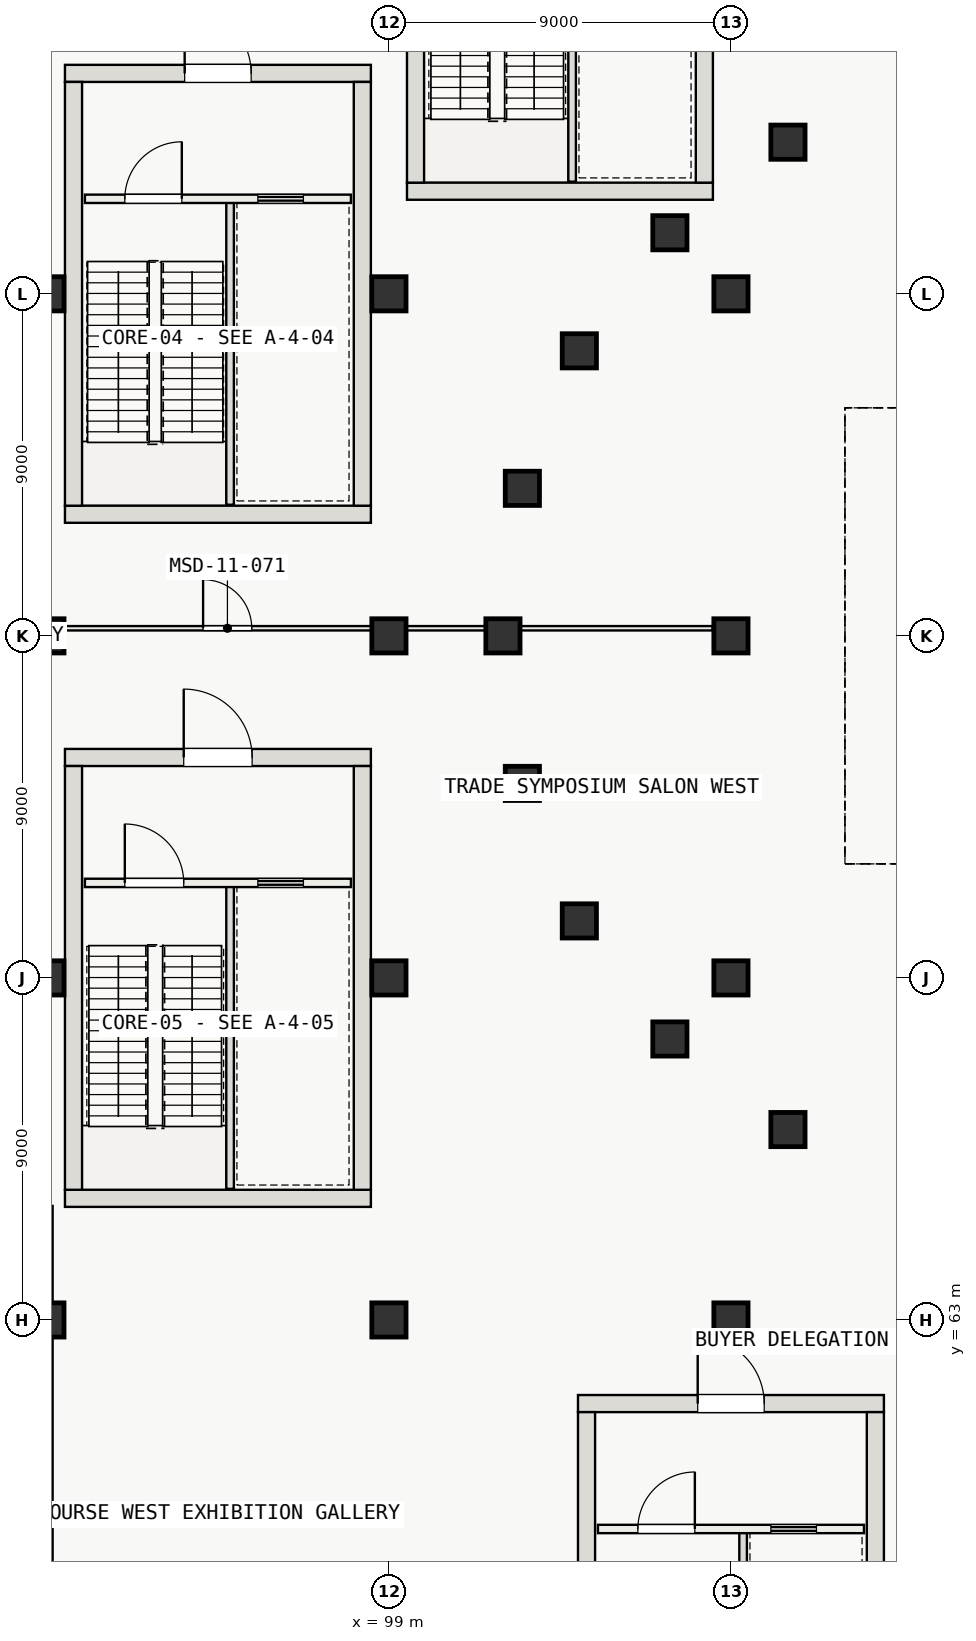
"""IFC4 building model, lengths in metres.
Left out: names, types, materials, properties, quantities, classifications, styles, units other than length and angle.
Written with IfcOpenShell. Run it as: python <this file> out.ifc"""

import sys

from ifc_helpers import new_model, si_unit, direction, frame, frame_2d, origin, origin_2d, place, context, subcontext, project, spatial, rectangle, circle, extrude, element, fill, save


model = new_model("IFC4")
c1 = context("Model", 3, precision=1e-05, world=origin(), true_north=direction((0.0, 1.0)))
c2 = subcontext(c1, "Body", "Model", "MODEL_VIEW")
j1 = project(units=[si_unit("LENGTHUNIT", "METRE"), si_unit("PLANEANGLEUNIT", "RADIAN")], contexts=[c1])
p1 = place(None, origin())
s1 = spatial("IfcSite", under=j1, at=p1, CompositionType="ELEMENT")
p2 = place(p1, origin())
s2 = spatial("IfcBuilding", under=s1, at=p2, CompositionType="ELEMENT")
p3 = place(p2, frame((0.0, 0.0, 6.0)))
s3 = spatial("IfcBuildingStorey", under=s2, at=p3, CompositionType="ELEMENT", Elevation=6.0)
p4 = place(p3, frame((99.475, 92.7, 0.0), z_axis=(0.0, 0.0, 1.0), x_axis=(1.0, 0.0, 0.0)))
e1 = element("IfcWall", 1, at=p4, inside=s3, PredefinedType="SHEAR", context=c2, shape_type="SweptSolid", body=[
    extrude(rectangle(XDim=8.05, YDim=0.45, at=frame_2d((4.025, 0.0))), origin(), (0.0, 0.0, 1.0), 6.0),
])
for number, where, z_axis, x_axis in (
    (2, (99.7, 92.925, 0.0), (0.0, 0.0, 1.0), (0.0, 1.0, 0.0)),
    (3, (107.3, 92.925, 0.0), (0.0, 0.0, 1.0), (0.0, 1.0, 0.0)),
):
    element("IfcWall", number, at=place(p3, frame(where, z_axis=z_axis, x_axis=x_axis)), inside=s3, PredefinedType="SHEAR", context=c2, shape_type="SweptSolid", body=[
        extrude(rectangle(XDim=11.15, YDim=0.45, at=frame_2d((5.575, 0.0))), origin(), (0.0, 0.0, 1.0), 6.0),
    ])
p5 = place(p3, frame((90.475, 84.2, 0.0), z_axis=(0.0, 0.0, 1.0), x_axis=(1.0, 0.0, 0.0)))
e4 = element("IfcWall", 4, at=p5, inside=s3, PredefinedType="SHEAR", context=c2, shape_type="SweptSolid", body=[
    extrude(rectangle(XDim=8.05, YDim=0.45, at=frame_2d((4.025, 0.0))), origin(), (0.0, 0.0, 1.0), 6.0),
])
p6 = place(p3, frame((90.475, 95.8, 0.0), z_axis=(0.0, 0.0, 1.0), x_axis=(1.0, 0.0, 0.0)))
e5 = element("IfcWall", 5, at=p6, inside=s3, PredefinedType="SHEAR", context=c2, shape_type="SweptSolid", body=[
    extrude(rectangle(XDim=8.05, YDim=0.45, at=frame_2d((4.025, 0.0))), origin(), (0.0, 0.0, 1.0), 6.0),
])
p7 = place(p6, frame((3.15, 0.0, 0.0)))
e6 = element("IfcOpeningElement", 6, at=p7, cuts=e5, PredefinedType="OPENING", context=c2, shape_type="SweptSolid", body=[
    extrude(rectangle(XDim=1.75, YDim=2.3, at=frame_2d((0.875, 1.15))), frame((0.0, 0.235, 0.0), z_axis=(0.0, -1.0, 0.0), x_axis=(1.0, 0.0, 0.0)), (0.0, 0.0, 1.0), 0.47),
])
for number, where, z_axis, x_axis in (
    (7, (90.7, 84.425, 0.0), (0.0, 0.0, 1.0), (0.0, 1.0, 0.0)),
    (8, (98.3, 84.425, 0.0), (0.0, 0.0, 1.0), (0.0, 1.0, 0.0)),
):
    element("IfcWall", number, at=place(p3, frame(where, z_axis=z_axis, x_axis=x_axis)), inside=s3, PredefinedType="SHEAR", context=c2, shape_type="SweptSolid", body=[
        extrude(rectangle(XDim=11.15, YDim=0.45, at=frame_2d((5.575, 0.0))), origin(), (0.0, 0.0, 1.0), 6.0),
    ])
p8 = place(p3, frame((90.475, 66.2, 0.0), z_axis=(0.0, 0.0, 1.0), x_axis=(1.0, 0.0, 0.0)))
e9 = element("IfcWall", 9, at=p8, inside=s3, PredefinedType="SHEAR", context=c2, shape_type="SweptSolid", body=[
    extrude(rectangle(XDim=8.05, YDim=0.45, at=frame_2d((4.025, 0.0))), origin(), (0.0, 0.0, 1.0), 6.0),
])
p9 = place(p3, frame((90.475, 77.8, 0.0), z_axis=(0.0, 0.0, 1.0), x_axis=(1.0, 0.0, 0.0)))
e10 = element("IfcWall", 10, at=p9, inside=s3, PredefinedType="SHEAR", context=c2, shape_type="SweptSolid", body=[
    extrude(rectangle(XDim=8.05, YDim=0.45, at=frame_2d((4.025, 0.0))), origin(), (0.0, 0.0, 1.0), 6.0),
])
p10 = place(p9, frame((3.125, 0.0, 0.0)))
e11 = element("IfcOpeningElement", 11, at=p10, cuts=e10, PredefinedType="OPENING", context=c2, shape_type="SweptSolid", body=[
    extrude(rectangle(XDim=1.8, YDim=2.3, at=frame_2d((0.9, 1.15))), frame((0.0, 0.235, 0.0), z_axis=(0.0, -1.0, 0.0), x_axis=(1.0, 0.0, 0.0)), (0.0, 0.0, 1.0), 0.47),
])
for number, where, z_axis, x_axis in (
    (12, (90.7, 66.425, 0.0), (0.0, 0.0, 1.0), (0.0, 1.0, 0.0)),
    (13, (98.3, 66.425, 0.0), (0.0, 0.0, 1.0), (0.0, 1.0, 0.0)),
):
    element("IfcWall", number, at=place(p3, frame(where, z_axis=z_axis, x_axis=x_axis)), inside=s3, PredefinedType="SHEAR", context=c2, shape_type="SweptSolid", body=[
        extrude(rectangle(XDim=11.15, YDim=0.45, at=frame_2d((5.575, 0.0))), origin(), (0.0, 0.0, 1.0), 6.0),
    ])
p11 = place(p3, frame((103.975, 60.8, 0.0), z_axis=(0.0, 0.0, 1.0), x_axis=(1.0, 0.0, 0.0)))
e14 = element("IfcWall", 14, at=p11, inside=s3, PredefinedType="SHEAR", context=c2, shape_type="SweptSolid", body=[
    extrude(rectangle(XDim=8.05, YDim=0.45, at=frame_2d((4.025, 0.0))), origin(), (0.0, 0.0, 1.0), 6.0),
])
p12 = place(p11, frame((3.15, 0.0, 0.0)))
e15 = element("IfcOpeningElement", 15, at=p12, cuts=e14, PredefinedType="OPENING", context=c2, shape_type="SweptSolid", body=[
    extrude(rectangle(XDim=1.75, YDim=2.3, at=frame_2d((0.875, 1.15))), frame((0.0, 0.235, 0.0), z_axis=(0.0, -1.0, 0.0), x_axis=(1.0, 0.0, 0.0)), (0.0, 0.0, 1.0), 0.47),
])
for number, where, z_axis, x_axis in (
    (16, (104.2, 49.425, 0.0), (0.0, 0.0, 1.0), (0.0, 1.0, 0.0)),
    (17, (111.8, 49.425, 0.0), (0.0, 0.0, 1.0), (0.0, 1.0, 0.0)),
):
    element("IfcWall", number, at=place(p3, frame(where, z_axis=z_axis, x_axis=x_axis)), inside=s3, PredefinedType="SHEAR", context=c2, shape_type="SweptSolid", body=[
        extrude(rectangle(XDim=11.15, YDim=0.45, at=frame_2d((5.575, 0.0))), origin(), (0.0, 0.0, 1.0), 6.0),
    ])
p13 = place(p3, frame((90.0, 54.0, 0.0), z_axis=(0.0, 0.0, 1.0), x_axis=(0.0, 1.0, 0.0)))
e18 = element("IfcWall", 18, at=p13, inside=s3, PredefinedType="SHEAR", context=c2, shape_type="SweptSolid", body=[
    extrude(rectangle(XDim=12.0, YDim=0.3, at=frame_2d((6.0, 0.0))), origin(), (0.0, 0.0, 1.0), 6.0),
])
for number, where, z_axis, x_axis in (
    (19, (90.0, 63.0, 0.0), (0.0, 0.0, 1.0), (1.0, 0.0, 0.0)),
    (20, (90.0, 72.0, 0.0), (0.0, 0.0, 1.0), (1.0, 0.0, 0.0)),
    (21, (90.0, 81.0, 0.0), (0.0, 0.0, 1.0), (1.0, 0.0, 0.0)),
    (22, (90.0, 90.0, 0.0), (0.0, 0.0, 1.0), (1.0, 0.0, 0.0)),
    (23, (99.0, 63.0, 0.0), (0.0, 0.0, 1.0), (1.0, 0.0, 0.0)),
    (24, (99.0, 72.0, 0.0), (0.0, 0.0, 1.0), (1.0, 0.0, 0.0)),
    (25, (99.0, 81.0, 0.0), (0.0, 0.0, 1.0), (1.0, 0.0, 0.0)),
    (26, (99.0, 90.0, 0.0), (0.0, 0.0, 1.0), (1.0, 0.0, 0.0)),
):
    element("IfcColumn", number, at=place(p3, frame(where, z_axis=z_axis, x_axis=x_axis)), inside=s3, PredefinedType="COLUMN", context=c2, shape_type="SweptSolid", body=[
        extrude(rectangle(XDim=0.9, YDim=0.9, at=origin_2d()), origin(), (0.0, 0.0, 1.0), 6.0),
    ])
for number, where, z_axis, x_axis in (
    (27, (102.0, 81.0, 0.0), (0.0, 0.0, 1.0), (1.0, 0.0, 0.0)),
    (28, (102.511, 77.118, 0.0), (0.0, 0.0, 1.0), (1.0, 0.0, 0.0)),
    (29, (102.511, 84.882, 0.0), (0.0, 0.0, 1.0), (1.0, 0.0, 0.0)),
    (30, (104.01, 73.5, 0.0), (0.0, 0.0, 1.0), (1.0, 0.0, 0.0)),
    (31, (104.01, 88.5, 0.0), (0.0, 0.0, 1.0), (1.0, 0.0, 0.0)),
    (32, (106.393, 70.393, 0.0), (0.0, 0.0, 1.0), (1.0, 0.0, 0.0)),
    (33, (106.393, 91.607, 0.0), (0.0, 0.0, 1.0), (1.0, 0.0, 0.0)),
):
    element("IfcColumn", number, at=place(p3, frame(where, z_axis=z_axis, x_axis=x_axis)), inside=s3, PredefinedType="COLUMN", context=c2, shape_type="SweptSolid", body=[
        extrude(circle(Radius=0.45, at=origin_2d()), origin(), (0.0, 0.0, 1.0), 6.0),
    ])
for number, where, z_axis, x_axis in (
    (34, (108.0, 63.0, 0.0), (0.0, 0.0, 1.0), (1.0, 0.0, 0.0)),
    (35, (108.0, 72.0, 0.0), (0.0, 0.0, 1.0), (1.0, 0.0, 0.0)),
    (36, (108.0, 81.0, 0.0), (0.0, 0.0, 1.0), (1.0, 0.0, 0.0)),
    (37, (108.0, 90.0, 0.0), (0.0, 0.0, 1.0), (1.0, 0.0, 0.0)),
):
    element("IfcColumn", number, at=place(p3, frame(where, z_axis=z_axis, x_axis=x_axis)), inside=s3, PredefinedType="COLUMN", context=c2, shape_type="SweptSolid", body=[
        extrude(rectangle(XDim=0.9, YDim=0.9, at=origin_2d()), origin(), (0.0, 0.0, 1.0), 6.0),
    ])
for number, where, z_axis, x_axis in (
    (38, (109.5, 68.01, 0.0), (0.0, 0.0, 1.0), (1.0, 0.0, 0.0)),
    (39, (109.5, 93.99, 0.0), (0.0, 0.0, 1.0), (1.0, 0.0, 0.0)),
):
    element("IfcColumn", number, at=place(p3, frame(where, z_axis=z_axis, x_axis=x_axis)), inside=s3, PredefinedType="COLUMN", context=c2, shape_type="SweptSolid", body=[
        extrude(circle(Radius=0.45, at=origin_2d()), origin(), (0.0, 0.0, 1.0), 6.0),
    ])
for number, where, z_axis, x_axis in (
    (40, (103.82, 92.95, 0.0), (0.0, 0.0, 1.0), (0.0, 1.0, 0.0)),
    (41, (94.82, 84.45, 0.0), (0.0, 0.0, 1.0), (0.0, 1.0, 0.0)),
):
    element("IfcWall", number, at=place(p3, frame(where, z_axis=z_axis, x_axis=x_axis)), inside=s3, PredefinedType="SOLIDWALL", context=c2, shape_type="SweptSolid", body=[
        extrude(rectangle(XDim=8.0, YDim=0.2, at=frame_2d((4.0, 0.0))), origin(), (0.0, 0.0, 1.0), 6.0),
    ])
p14 = place(p3, frame((91.0, 92.5, 0.0), z_axis=(0.0, 0.0, 1.0), x_axis=(1.0, 0.0, 0.0)))
e42 = element("IfcWall", 42, at=p14, inside=s3, PredefinedType="SOLIDWALL", context=c2, shape_type="SweptSolid", body=[
    extrude(rectangle(XDim=7.0, YDim=0.22, at=frame_2d((3.5, 0.0))), origin(), (0.0, 0.0, 1.0), 5.62),
])
p15 = place(p14, frame((1.05, 0.0, 0.0)))
e43 = element("IfcOpeningElement", 43, at=p15, cuts=e42, PredefinedType="OPENING", context=c2, shape_type="SweptSolid", body=[
    extrude(rectangle(XDim=1.5, YDim=2.2, at=frame_2d((0.75, 1.1))), frame((0.0, 0.12, 0.0), z_axis=(0.0, -1.0, 0.0), x_axis=(1.0, 0.0, 0.0)), (0.0, 0.0, 1.0), 0.24),
])
p16 = place(p14, frame((4.55, 0.0, 0.0)))
e44 = element("IfcOpeningElement", 44, at=p16, cuts=e42, PredefinedType="OPENING", context=c2, shape_type="SweptSolid", body=[
    extrude(rectangle(XDim=1.2, YDim=2.2, at=frame_2d((0.6, 1.1))), frame((0.0, 0.12, 0.0), z_axis=(0.0, -1.0, 0.0), x_axis=(1.0, 0.0, 0.0)), (0.0, 0.0, 1.0), 0.24),
])
p17 = place(p3, frame((94.82, 66.45, 0.0), z_axis=(0.0, 0.0, 1.0), x_axis=(0.0, 1.0, 0.0)))
e45 = element("IfcWall", 45, at=p17, inside=s3, PredefinedType="SOLIDWALL", context=c2, shape_type="SweptSolid", body=[
    extrude(rectangle(XDim=8.0, YDim=0.2, at=frame_2d((4.0, 0.0))), origin(), (0.0, 0.0, 1.0), 6.0),
])
p18 = place(p3, frame((91.0, 74.5, 0.0), z_axis=(0.0, 0.0, 1.0), x_axis=(1.0, 0.0, 0.0)))
e46 = element("IfcWall", 46, at=p18, inside=s3, PredefinedType="SOLIDWALL", context=c2, shape_type="SweptSolid", body=[
    extrude(rectangle(XDim=7.0, YDim=0.22, at=frame_2d((3.5, 0.0))), origin(), (0.0, 0.0, 1.0), 5.62),
])
p19 = place(p18, frame((1.05, 0.0, 0.0)))
e47 = element("IfcOpeningElement", 47, at=p19, cuts=e46, PredefinedType="OPENING", context=c2, shape_type="SweptSolid", body=[
    extrude(rectangle(XDim=1.55, YDim=2.2, at=frame_2d((0.775, 1.1))), frame((0.0, 0.12, 0.0), z_axis=(0.0, -1.0, 0.0), x_axis=(1.0, 0.0, 0.0)), (0.0, 0.0, 1.0), 0.24),
])
p20 = place(p18, frame((4.55, 0.0, 0.0)))
e48 = element("IfcOpeningElement", 48, at=p20, cuts=e46, PredefinedType="OPENING", context=c2, shape_type="SweptSolid", body=[
    extrude(rectangle(XDim=1.2, YDim=2.2, at=frame_2d((0.6, 1.1))), frame((0.0, 0.12, 0.0), z_axis=(0.0, -1.0, 0.0), x_axis=(1.0, 0.0, 0.0)), (0.0, 0.0, 1.0), 0.24),
])
p21 = place(p3, frame((108.32, 49.45, 0.0), z_axis=(0.0, 0.0, 1.0), x_axis=(0.0, 1.0, 0.0)))
e49 = element("IfcWall", 49, at=p21, inside=s3, PredefinedType="SOLIDWALL", context=c2, shape_type="SweptSolid", body=[
    extrude(rectangle(XDim=8.0, YDim=0.2, at=frame_2d((4.0, 0.0))), origin(), (0.0, 0.0, 1.0), 6.0),
])
p22 = place(p3, frame((104.5, 57.5, 0.0), z_axis=(0.0, 0.0, 1.0), x_axis=(1.0, 0.0, 0.0)))
e50 = element("IfcWall", 50, at=p22, inside=s3, PredefinedType="SOLIDWALL", context=c2, shape_type="SweptSolid", body=[
    extrude(rectangle(XDim=7.0, YDim=0.22, at=frame_2d((3.5, 0.0))), origin(), (0.0, 0.0, 1.0), 5.62),
])
p23 = place(p22, frame((1.05, 0.0, 0.0)))
e51 = element("IfcOpeningElement", 51, at=p23, cuts=e50, PredefinedType="OPENING", context=c2, shape_type="SweptSolid", body=[
    extrude(rectangle(XDim=1.5, YDim=2.2, at=frame_2d((0.75, 1.1))), frame((0.0, 0.12, 0.0), z_axis=(0.0, -1.0, 0.0), x_axis=(1.0, 0.0, 0.0)), (0.0, 0.0, 1.0), 0.24),
])
p24 = place(p22, frame((4.55, 0.0, 0.0)))
e52 = element("IfcOpeningElement", 52, at=p24, cuts=e50, PredefinedType="OPENING", context=c2, shape_type="SweptSolid", body=[
    extrude(rectangle(XDim=1.2, YDim=2.2, at=frame_2d((0.6, 1.1))), frame((0.0, 0.12, 0.0), z_axis=(0.0, -1.0, 0.0), x_axis=(1.0, 0.0, 0.0)), (0.0, 0.0, 1.0), 0.24),
])
p25 = place(p3, frame((81.98, 81.2, 0.0), z_axis=(0.0, 0.0, 1.0), x_axis=(1.0, 0.0, 0.0)))
e53 = element("IfcWall", 53, at=p25, inside=s3, PredefinedType="PARTITIONING", context=c2, shape_type="SweptSolid", body=[
    extrude(rectangle(XDim=25.54, YDim=0.115, at=frame_2d((12.77, 0.0))), origin(), (0.0, 0.0, 1.0), 4.64),
])
p26 = place(p25, frame((12.13, 0.0, 0.0)))
e54 = element("IfcOpeningElement", 54, at=p26, cuts=e53, PredefinedType="OPENING", context=c2, shape_type="SweptSolid", body=[
    extrude(rectangle(XDim=1.28, YDim=2.18, at=frame_2d((0.64, 1.09))), frame((0.0, 0.067, 0.0), z_axis=(0.0, -1.0, 0.0), x_axis=(1.0, 0.0, 0.0)), (0.0, 0.0, 1.0), 0.135),
])
p27 = place(p15, origin())
e55 = element("IfcDoor", 55, at=p27, inside=s3, OperationType="SINGLE_SWING_RIGHT", PredefinedType="DOOR", context=c2, shape_type="SweptSolid", body=[
    extrude(rectangle(XDim=1.5, YDim=2.2, at=frame_2d((0.75, 1.1))), frame((0.0, 0.025, 0.0), z_axis=(0.0, -1.0, 0.0), x_axis=(1.0, 0.0, 0.0)), (0.0, 0.0, 1.0), 0.05),
])
fill(e43, e55)
p28 = place(p16, origin())
e56 = element("IfcDoor", 56, at=p28, inside=s3, OperationType="SLIDING_TO_RIGHT", PredefinedType="DOOR", context=c2, shape_type="SweptSolid", body=[
    extrude(rectangle(XDim=1.2, YDim=2.2, at=frame_2d((0.6, 1.1))), frame((0.0, 0.025, 0.0), z_axis=(0.0, -1.0, 0.0), x_axis=(1.0, 0.0, 0.0)), (0.0, 0.0, 1.0), 0.05),
])
fill(e44, e56)
p29 = place(p7, origin())
e57 = element("IfcDoor", 57, at=p29, inside=s3, OperationType="DOUBLE_DOOR_SINGLE_SWING", PredefinedType="DOOR", context=c2, shape_type="SweptSolid", body=[
    extrude(rectangle(XDim=1.75, YDim=2.3, at=frame_2d((0.875, 1.15))), frame((0.0, 0.025, 0.0), z_axis=(0.0, -1.0, 0.0), x_axis=(1.0, 0.0, 0.0)), (0.0, 0.0, 1.0), 0.05),
])
fill(e6, e57)
p30 = place(p19, origin())
e58 = element("IfcDoor", 58, at=p30, inside=s3, OperationType="SINGLE_SWING_LEFT", PredefinedType="DOOR", context=c2, shape_type="SweptSolid", body=[
    extrude(rectangle(XDim=1.55, YDim=2.2, at=frame_2d((0.775, 1.1))), frame((0.0, 0.025, 0.0), z_axis=(0.0, -1.0, 0.0), x_axis=(1.0, 0.0, 0.0)), (0.0, 0.0, 1.0), 0.05),
])
fill(e47, e58)
p31 = place(p20, origin())
e59 = element("IfcDoor", 59, at=p31, inside=s3, OperationType="SLIDING_TO_LEFT", PredefinedType="DOOR", context=c2, shape_type="SweptSolid", body=[
    extrude(rectangle(XDim=1.2, YDim=2.2, at=frame_2d((0.6, 1.1))), frame((0.0, 0.025, 0.0), z_axis=(0.0, -1.0, 0.0), x_axis=(1.0, 0.0, 0.0)), (0.0, 0.0, 1.0), 0.05),
])
fill(e48, e59)
p32 = place(p10, origin())
e60 = element("IfcDoor", 60, at=p32, inside=s3, OperationType="DOUBLE_DOOR_SINGLE_SWING", PredefinedType="DOOR", context=c2, shape_type="SweptSolid", body=[
    extrude(rectangle(XDim=1.8, YDim=2.3, at=frame_2d((0.9, 1.15))), frame((0.0, 0.025, 0.0), z_axis=(0.0, -1.0, 0.0), x_axis=(1.0, 0.0, 0.0)), (0.0, 0.0, 1.0), 0.05),
])
fill(e11, e60)
p33 = place(p23, origin())
e61 = element("IfcDoor", 61, at=p33, inside=s3, OperationType="SINGLE_SWING_RIGHT", PredefinedType="DOOR", context=c2, shape_type="SweptSolid", body=[
    extrude(rectangle(XDim=1.5, YDim=2.2, at=frame_2d((0.75, 1.1))), frame((0.0, 0.025, 0.0), z_axis=(0.0, -1.0, 0.0), x_axis=(1.0, 0.0, 0.0)), (0.0, 0.0, 1.0), 0.05),
])
fill(e51, e61)
p34 = place(p24, origin())
e62 = element("IfcDoor", 62, at=p34, inside=s3, OperationType="SLIDING_TO_RIGHT", PredefinedType="DOOR", context=c2, shape_type="SweptSolid", body=[
    extrude(rectangle(XDim=1.2, YDim=2.2, at=frame_2d((0.6, 1.1))), frame((0.0, 0.025, 0.0), z_axis=(0.0, -1.0, 0.0), x_axis=(1.0, 0.0, 0.0)), (0.0, 0.0, 1.0), 0.05),
])
fill(e52, e62)
p35 = place(p12, origin())
e63 = element("IfcDoor", 63, at=p35, inside=s3, OperationType="DOUBLE_DOOR_SINGLE_SWING", PredefinedType="DOOR", context=c2, shape_type="SweptSolid", body=[
    extrude(rectangle(XDim=1.75, YDim=2.3, at=frame_2d((0.875, 1.15))), frame((0.0, 0.025, 0.0), z_axis=(0.0, -1.0, 0.0), x_axis=(1.0, 0.0, 0.0)), (0.0, 0.0, 1.0), 0.05),
])
fill(e15, e63)
p36 = place(p26, origin())
e64 = element("IfcDoor", 64, at=p36, inside=s3, OperationType="SINGLE_SWING_LEFT", PredefinedType="DOOR", context=c2, shape_type="SweptSolid", body=[
    extrude(rectangle(XDim=1.28, YDim=2.18, at=frame_2d((0.64, 1.09))), frame((0.0, 0.025, 0.0), z_axis=(0.0, -1.0, 0.0), x_axis=(1.0, 0.0, 0.0)), (0.0, 0.0, 1.0), 0.05),
])
fill(e54, e64)
save(model, sys.argv[1])
